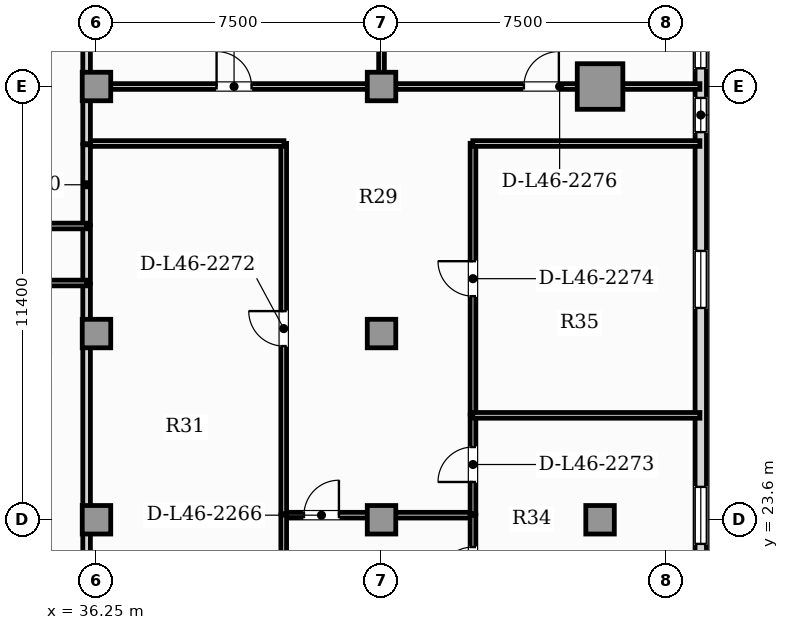
"""IFC4 building model, lengths in metres.
Left out: names, types, materials, properties, quantities, classifications, styles, units other than length and angle.
Written with IfcOpenShell. Run it as: python <this file> out.ifc"""

import sys

from ifc_helpers import new_model, si_unit, direction, frame, frame_2d, origin, origin_2d, place, context, subcontext, project, spatial, rectangle, hollow_rectangle, extrude, element, fill, save


model = new_model("IFC4")
c1 = context("Model", 3, precision=1e-05, world=origin(), true_north=direction((0.0, 1.0)))
c2 = subcontext(c1, "Body", "Model", "MODEL_VIEW")
j1 = project(units=[si_unit("LENGTHUNIT", "METRE"), si_unit("PLANEANGLEUNIT", "RADIAN")], contexts=[c1])
p1 = place(None, origin())
s1 = spatial("IfcSite", under=j1, at=p1, CompositionType="ELEMENT")
p2 = place(p1, origin())
s2 = spatial("IfcBuilding", under=s1, at=p2, CompositionType="ELEMENT")
p3 = place(p2, frame((0.0, 0.0, 187.55)))
s3 = spatial("IfcBuildingStorey", under=s2, at=p3, CompositionType="ELEMENT", Elevation=187.55)
p4 = place(p3, frame((49.5, 35.0, 0.0), z_axis=(0.0, 0.0, 1.0), x_axis=(1.0, 0.0, 0.0)))
e1 = element("IfcColumn", 1, at=p4, inside=s3, PredefinedType="USERDEFINED", context=c2, shape_type="SweptSolid", body=[
    extrude(hollow_rectangle(XDim=1.2, YDim=1.2, WallThickness=0.07, at=origin_2d()), origin(), (0.0, 0.0, 1.0), 5.05),
])
for number, where, z_axis, x_axis in (
    (2, (36.25, 23.6, 0.0), (0.0, 0.0, 1.0), (1.0, 0.0, 0.0)),
    (3, (43.75, 23.6, 0.0), (0.0, 0.0, 1.0), (1.0, 0.0, 0.0)),
    (4, (49.5, 23.6, 0.0), (0.0, 0.0, 1.0), (1.0, 0.0, 0.0)),
    (5, (36.25, 28.5, 0.0), (0.0, 0.0, 1.0), (1.0, 0.0, 0.0)),
    (6, (43.75, 28.5, 0.0), (0.0, 0.0, 1.0), (1.0, 0.0, 0.0)),
    (7, (36.25, 35.0, 0.0), (0.0, 0.0, 1.0), (1.0, 0.0, 0.0)),
    (8, (43.75, 35.0, 0.0), (0.0, 0.0, 1.0), (1.0, 0.0, 0.0)),
):
    element("IfcColumn", number, at=place(p3, frame(where, z_axis=z_axis, x_axis=x_axis)), inside=s3, PredefinedType="COLUMN", context=c2, shape_type="SweptSolid", body=[
        extrude(rectangle(XDim=0.75, YDim=0.75, at=origin_2d()), origin(), (0.0, 0.0, 1.0), 5.05),
    ])
p5 = place(p3, frame((52.15, 3.24, 0.0), z_axis=(0.0, 0.0, 1.0), x_axis=(0.0, 1.0, 0.0)))
e9 = element("IfcWall", 9, at=p5, inside=s3, PredefinedType="SOLIDWALL", context=c2, shape_type="SweptSolid", body=[
    extrude(rectangle(XDim=33.92, YDim=0.3, at=frame_2d((16.96, 0.0))), origin(), (0.0, 0.0, 1.0), 4.83),
])
p6 = place(p5, frame((30.56, 0.0, 0.95)))
e10 = element("IfcOpeningElement", 10, at=p6, cuts=e9, PredefinedType="OPENING", context=c2, shape_type="SweptSolid", body=[
    extrude(rectangle(XDim=0.9, YDim=1.5, at=frame_2d((0.45, 0.75))), frame((0.0, 0.16, 0.0), z_axis=(0.0, -1.0, 0.0), x_axis=(1.0, 0.0, 0.0)), (0.0, 0.0, 1.0), 0.32),
])
p7 = place(p5, frame((10.805, 0.0, 0.9)))
e11 = element("IfcOpeningElement", 11, at=p7, cuts=e9, PredefinedType="OPENING", context=c2, shape_type="SweptSolid", body=[
    extrude(rectangle(XDim=1.5, YDim=1.95, at=frame_2d((0.75, 0.975))), frame((0.0, 0.16, 0.0), z_axis=(0.0, -1.0, 0.0), x_axis=(1.0, 0.0, 0.0)), (0.0, 0.0, 1.0), 0.32),
])
p8 = place(p5, frame((14.462, 0.0, 0.9)))
e12 = element("IfcOpeningElement", 12, at=p8, cuts=e9, PredefinedType="OPENING", context=c2, shape_type="SweptSolid", body=[
    extrude(rectangle(XDim=1.5, YDim=1.95, at=frame_2d((0.75, 0.975))), frame((0.0, 0.16, 0.0), z_axis=(0.0, -1.0, 0.0), x_axis=(1.0, 0.0, 0.0)), (0.0, 0.0, 1.0), 0.32),
])
p9 = place(p5, frame((19.726, 0.0, 0.9)))
e13 = element("IfcOpeningElement", 13, at=p9, cuts=e9, PredefinedType="OPENING", context=c2, shape_type="SweptSolid", body=[
    extrude(rectangle(XDim=1.5, YDim=1.95, at=frame_2d((0.75, 0.975))), frame((0.0, 0.16, 0.0), z_axis=(0.0, -1.0, 0.0), x_axis=(1.0, 0.0, 0.0)), (0.0, 0.0, 1.0), 0.32),
])
p10 = place(p5, frame((25.934, 0.0, 0.9)))
e14 = element("IfcOpeningElement", 14, at=p10, cuts=e9, PredefinedType="OPENING", context=c2, shape_type="SweptSolid", body=[
    extrude(rectangle(XDim=1.5, YDim=1.95, at=frame_2d((0.75, 0.975))), frame((0.0, 0.16, 0.0), z_axis=(0.0, -1.0, 0.0), x_axis=(1.0, 0.0, 0.0)), (0.0, 0.0, 1.0), 0.32),
])
p11 = place(p5, frame((32.24, 0.0, 0.95)))
e15 = element("IfcOpeningElement", 15, at=p11, cuts=e9, PredefinedType="OPENING", context=c2, shape_type="SweptSolid", body=[
    extrude(rectangle(XDim=0.9, YDim=1.5, at=frame_2d((0.45, 0.75))), frame((0.0, 0.16, 0.0), z_axis=(0.0, -1.0, 0.0), x_axis=(1.0, 0.0, 0.0)), (0.0, 0.0, 1.0), 0.32),
])
p12 = place(p3, frame((41.171, 23.721, 0.0), z_axis=(0.0, 0.0, 1.0), x_axis=(1.0, 0.0, 0.0)))
e16 = element("IfcWall", 16, at=p12, inside=s3, PredefinedType="PARTITIONING", context=c2, shape_type="SweptSolid", body=[
    extrude(rectangle(XDim=4.99, YDim=0.15, at=frame_2d((2.495, 0.0))), origin(), (0.0, 0.0, 1.0), 4.285),
])
p13 = place(p12, frame((0.538, 0.0, 0.0)))
e17 = element("IfcOpeningElement", 17, at=p13, cuts=e16, PredefinedType="OPENING", context=c2, shape_type="SweptSolid", body=[
    extrude(rectangle(XDim=0.92, YDim=2.1, at=frame_2d((0.46, 1.05))), frame((0.0, 0.085, 0.0), z_axis=(0.0, -1.0, 0.0), x_axis=(1.0, 0.0, 0.0)), (0.0, 0.0, 1.0), 0.17),
])
p14 = place(p3, frame((41.177, 15.635, 0.0), z_axis=(0.0, 0.0, 1.0), x_axis=(0.0, 1.0, 0.0)))
e18 = element("IfcWall", 18, at=p14, inside=s3, PredefinedType="PARTITIONING", context=c2, shape_type="SweptSolid", body=[
    extrude(rectangle(XDim=8.091, YDim=0.15, at=frame_2d((4.045, 0.0))), origin(), (0.0, 0.0, 1.0), 4.83),
])
p15 = place(p14, frame((3.585, 0.0, 0.0)))
e19 = element("IfcOpeningElement", 19, at=p15, cuts=e18, PredefinedType="OPENING", context=c2, shape_type="SweptSolid", body=[
    extrude(rectangle(XDim=0.92, YDim=2.1, at=frame_2d((0.46, 1.05))), frame((0.0, 0.085, 0.0), z_axis=(0.0, -1.0, 0.0), x_axis=(1.0, 0.0, 0.0)), (0.0, 0.0, 1.0), 0.17),
])
p16 = place(p3, frame((46.156, 21.119, 0.0), z_axis=(0.0, 0.0, 1.0), x_axis=(0.0, 1.0, 0.0)))
e20 = element("IfcWall", 20, at=p16, inside=s3, PredefinedType="PARTITIONING", context=c2, shape_type="SweptSolid", body=[
    extrude(rectangle(XDim=2.607, YDim=0.15, at=frame_2d((1.304, 0.0))), origin(), (0.0, 0.0, 1.0), 4.83),
])
p17 = place(p16, frame((0.844, 0.0, 0.0)))
e21 = element("IfcOpeningElement", 21, at=p17, cuts=e20, PredefinedType="OPENING", context=c2, shape_type="SweptSolid", body=[
    extrude(rectangle(XDim=0.92, YDim=2.1, at=frame_2d((0.46, 1.05))), frame((0.0, 0.085, 0.0), z_axis=(0.0, -1.0, 0.0), x_axis=(1.0, 0.0, 0.0)), (0.0, 0.0, 1.0), 0.17),
])
p18 = place(p3, frame((41.177, 23.756, 0.0), z_axis=(0.0, 0.0, 1.0), x_axis=(0.0, 1.0, 0.0)))
e22 = element("IfcWall", 22, at=p18, inside=s3, PredefinedType="PARTITIONING", context=c2, shape_type="SweptSolid", body=[
    extrude(rectangle(XDim=9.749, YDim=0.15, at=frame_2d((4.875, 0.0))), origin(), (0.0, 0.0, 1.0), 4.83),
])
p19 = place(p18, frame((4.415, 0.0, 0.0)))
e23 = element("IfcOpeningElement", 23, at=p19, cuts=e22, PredefinedType="OPENING", context=c2, shape_type="SweptSolid", body=[
    extrude(rectangle(XDim=0.92, YDim=2.1, at=frame_2d((0.46, 1.05))), frame((0.0, 0.085, 0.0), z_axis=(0.0, -1.0, 0.0), x_axis=(1.0, 0.0, 0.0)), (0.0, 0.0, 1.0), 0.17),
])
p20 = place(p3, frame((35.985, 33.5, 0.0), z_axis=(0.0, 0.0, 1.0), x_axis=(1.0, 0.0, 0.0)))
e24 = element("IfcWall", 24, at=p20, inside=s3, PredefinedType="PARTITIONING", context=c2, shape_type="SweptSolid", body=[
    extrude(rectangle(XDim=5.196, YDim=0.15, at=frame_2d((2.598, 0.0))), origin(), (0.0, 0.0, 1.0), 4.83),
])
p21 = place(p3, frame((46.156, 23.756, 0.0), z_axis=(0.0, 0.0, 1.0), x_axis=(0.0, 1.0, 0.0)))
e25 = element("IfcWall", 25, at=p21, inside=s3, PredefinedType="PARTITIONING", context=c2, shape_type="SweptSolid", body=[
    extrude(rectangle(XDim=2.596, YDim=0.15, at=frame_2d((1.298, 0.0))), origin(), (0.0, 0.0, 1.0), 4.83),
])
p22 = place(p21, frame((0.838, 0.0, 0.0)))
e26 = element("IfcOpeningElement", 26, at=p22, cuts=e25, PredefinedType="OPENING", context=c2, shape_type="SweptSolid", body=[
    extrude(rectangle(XDim=0.92, YDim=2.1, at=frame_2d((0.46, 1.05))), frame((0.0, 0.085, 0.0), z_axis=(0.0, -1.0, 0.0), x_axis=(1.0, 0.0, 0.0)), (0.0, 0.0, 1.0), 0.17),
])
p23 = place(p3, frame((46.156, 26.382, 0.0), z_axis=(0.0, 0.0, 1.0), x_axis=(0.0, 1.0, 0.0)))
e27 = element("IfcWall", 27, at=p23, inside=s3, PredefinedType="PARTITIONING", context=c2, shape_type="SweptSolid", body=[
    extrude(rectangle(XDim=7.123, YDim=0.15, at=frame_2d((3.561, 0.0))), origin(), (0.0, 0.0, 1.0), 4.83),
])
p24 = place(p23, frame((3.101, 0.0, 0.0)))
e28 = element("IfcOpeningElement", 28, at=p24, cuts=e27, PredefinedType="OPENING", context=c2, shape_type="SweptSolid", body=[
    extrude(rectangle(XDim=0.92, YDim=2.1, at=frame_2d((0.46, 1.05))), frame((0.0, 0.085, 0.0), z_axis=(0.0, -1.0, 0.0), x_axis=(1.0, 0.0, 0.0)), (0.0, 0.0, 1.0), 0.17),
])
p25 = place(p3, frame((46.151, 33.5, 0.0), z_axis=(0.0, 0.0, 1.0), x_axis=(1.0, 0.0, 0.0)))
e29 = element("IfcWall", 29, at=p25, inside=s3, PredefinedType="PARTITIONING", context=c2, shape_type="SweptSolid", body=[
    extrude(rectangle(XDim=5.976, YDim=0.15, at=frame_2d((2.988, 0.0))), origin(), (0.0, 0.0, 1.0), 4.83),
])
p26 = place(p3, frame((35.985, 35.0, 0.0), z_axis=(0.0, 0.0, 1.0), x_axis=(1.0, 0.0, 0.0)))
e30 = element("IfcWall", 30, at=p26, inside=s3, PredefinedType="PARTITIONING", context=c2, shape_type="SweptSolid", body=[
    extrude(rectangle(XDim=7.77, YDim=0.15, at=frame_2d((3.885, 0.0))), origin(), (0.0, 0.0, 1.0), 4.285),
])
p27 = place(p26, frame((3.425, 0.0, 0.0)))
e31 = element("IfcOpeningElement", 31, at=p27, cuts=e30, PredefinedType="OPENING", context=c2, shape_type="SweptSolid", body=[
    extrude(rectangle(XDim=0.92, YDim=2.1, at=frame_2d((0.46, 1.05))), frame((0.0, 0.085, 0.0), z_axis=(0.0, -1.0, 0.0), x_axis=(1.0, 0.0, 0.0)), (0.0, 0.0, 1.0), 0.17),
])
p28 = place(p3, frame((43.785, 35.0, 0.0), z_axis=(0.0, 0.0, 1.0), x_axis=(1.0, 0.0, 0.0)))
e32 = element("IfcWall", 32, at=p28, inside=s3, PredefinedType="PARTITIONING", context=c2, shape_type="SweptSolid", body=[
    extrude(rectangle(XDim=8.343, YDim=0.15, at=frame_2d((4.171, 0.0))), origin(), (0.0, 0.0, 1.0), 4.285),
])
p29 = place(p28, frame((3.711, 0.0, 0.0)))
e33 = element("IfcOpeningElement", 33, at=p29, cuts=e32, PredefinedType="OPENING", context=c2, shape_type="SweptSolid", body=[
    extrude(rectangle(XDim=0.92, YDim=2.1, at=frame_2d((0.46, 1.05))), frame((0.0, 0.085, 0.0), z_axis=(0.0, -1.0, 0.0), x_axis=(1.0, 0.0, 0.0)), (0.0, 0.0, 1.0), 0.17),
])
p30 = place(p3, frame((35.99, 33.495, 0.0), z_axis=(0.0, 0.0, 1.0), x_axis=(0.0, 1.0, 0.0)))
e34 = element("IfcWall", 34, at=p30, inside=s3, PredefinedType="PARTITIONING", context=c2, shape_type="SweptSolid", body=[
    extrude(rectangle(XDim=2.988, YDim=0.2, at=frame_2d((1.494, 0.0))), origin(), (0.0, 0.0, 1.0), 4.83),
])
p31 = place(p3, frame((35.99, 29.825, 0.0), z_axis=(0.0, 0.0, 1.0), x_axis=(0.0, 1.0, 0.0)))
e35 = element("IfcWall", 35, at=p31, inside=s3, PredefinedType="PARTITIONING", context=c2, shape_type="SweptSolid", body=[
    extrude(rectangle(XDim=1.51, YDim=0.2, at=frame_2d((0.755, 0.0))), origin(), (0.0, 0.0, 1.0), 4.83),
])
p32 = place(p3, frame((35.99, 21.945, 0.0), z_axis=(0.0, 0.0, 1.0), x_axis=(0.0, 1.0, 0.0)))
e36 = element("IfcWall", 36, at=p32, inside=s3, PredefinedType="PARTITIONING", context=c2, shape_type="SweptSolid", body=[
    extrude(rectangle(XDim=7.85, YDim=0.2, at=frame_2d((3.925, 0.0))), origin(), (0.0, 0.0, 1.0), 4.83),
])
p33 = place(p3, frame((35.99, 31.365, 0.0), z_axis=(0.0, 0.0, 1.0), x_axis=(0.0, 1.0, 0.0)))
e37 = element("IfcWall", 37, at=p33, inside=s3, PredefinedType="PARTITIONING", context=c2, shape_type="SweptSolid", body=[
    extrude(rectangle(XDim=2.1, YDim=0.2, at=frame_2d((1.05, 0.0))), origin(), (0.0, 0.0, 1.0), 4.83),
])
p34 = place(p3, frame((46.151, 26.347, 0.0), z_axis=(0.0, 0.0, 1.0), x_axis=(1.0, 0.0, 0.0)))
e38 = element("IfcWall", 38, at=p34, inside=s3, PredefinedType="PARTITIONING", context=c2, shape_type="SweptSolid", body=[
    extrude(rectangle(XDim=5.976, YDim=0.15, at=frame_2d((2.988, 0.0))), origin(), (0.0, 0.0, 1.0), 4.83),
])
p35 = place(p3, frame((43.75, 34.995, 0.0), z_axis=(0.0, 0.0, 1.0), x_axis=(0.0, 1.0, 0.0)))
e39 = element("IfcWall", 39, at=p35, inside=s3, PredefinedType="PARTITIONING", context=c2, shape_type="SweptSolid", body=[
    extrude(rectangle(XDim=5.232, YDim=0.15, at=frame_2d((2.616, 0.0))), origin(), (0.0, 0.0, 1.0), 4.83),
])
p36 = place(p3, frame((31.265, 29.83, 0.0), z_axis=(0.0, 0.0, 1.0), x_axis=(1.0, 0.0, 0.0)))
e40 = element("IfcWall", 40, at=p36, inside=s3, PredefinedType="PARTITIONING", context=c2, shape_type="SweptSolid", body=[
    extrude(rectangle(XDim=4.73, YDim=0.15, at=frame_2d((2.365, 0.0))), origin(), (0.0, 0.0, 1.0), 4.83),
])
p37 = place(p3, frame((28.785, 31.33, 0.0), z_axis=(0.0, 0.0, 1.0), x_axis=(1.0, 0.0, 0.0)))
e41 = element("IfcWall", 41, at=p37, inside=s3, PredefinedType="PARTITIONING", context=c2, shape_type="SweptSolid", body=[
    extrude(rectangle(XDim=7.21, YDim=0.15, at=frame_2d((3.605, 0.0))), origin(), (0.0, 0.0, 1.0), 4.83),
])
p38 = place(p37, frame((3.145, 0.0, 0.0)))
e42 = element("IfcOpeningElement", 42, at=p38, cuts=e41, PredefinedType="OPENING", context=c2, shape_type="SweptSolid", body=[
    extrude(rectangle(XDim=0.92, YDim=2.1, at=frame_2d((0.46, 1.05))), frame((0.0, 0.085, 0.0), z_axis=(0.0, -1.0, 0.0), x_axis=(1.0, 0.0, 0.0)), (0.0, 0.0, 1.0), 0.17),
])
p39 = place(p6, origin())
e43 = element("IfcWindow", 43, at=p39, inside=s3, PartitioningType="SINGLE_PANEL", PredefinedType="WINDOW", context=c2, shape_type="SweptSolid", body=[
    extrude(rectangle(XDim=0.9, YDim=1.5, at=frame_2d((0.45, 0.75))), frame((0.0, 0.03, 0.0), z_axis=(0.0, -1.0, 0.0), x_axis=(1.0, 0.0, 0.0)), (0.0, 0.0, 1.0), 0.06),
])
fill(e10, e43)
p40 = place(p9, origin())
e44 = element("IfcWindow", 44, at=p40, inside=s3, PartitioningType="SINGLE_PANEL", PredefinedType="WINDOW", context=c2, shape_type="SweptSolid", body=[
    extrude(rectangle(XDim=1.5, YDim=1.95, at=frame_2d((0.75, 0.975))), frame((0.0, 0.03, 0.0), z_axis=(0.0, -1.0, 0.0), x_axis=(1.0, 0.0, 0.0)), (0.0, 0.0, 1.0), 0.06),
])
fill(e13, e44)
p41 = place(p10, origin())
e45 = element("IfcWindow", 45, at=p41, inside=s3, PartitioningType="SINGLE_PANEL", PredefinedType="WINDOW", context=c2, shape_type="SweptSolid", body=[
    extrude(rectangle(XDim=1.5, YDim=1.95, at=frame_2d((0.75, 0.975))), frame((0.0, 0.03, 0.0), z_axis=(0.0, -1.0, 0.0), x_axis=(1.0, 0.0, 0.0)), (0.0, 0.0, 1.0), 0.06),
])
fill(e14, e45)
p42 = place(p11, origin())
e46 = element("IfcWindow", 46, at=p42, inside=s3, PartitioningType="SINGLE_PANEL", PredefinedType="WINDOW", context=c2, shape_type="SweptSolid", body=[
    extrude(rectangle(XDim=0.9, YDim=1.5, at=frame_2d((0.45, 0.75))), frame((0.0, 0.03, 0.0), z_axis=(0.0, -1.0, 0.0), x_axis=(1.0, 0.0, 0.0)), (0.0, 0.0, 1.0), 0.06),
])
fill(e15, e46)
p43 = place(p13, origin())
e47 = element("IfcDoor", 47, at=p43, inside=s3, OperationType="SINGLE_SWING_RIGHT", PredefinedType="DOOR", context=c2, shape_type="SweptSolid", body=[
    extrude(rectangle(XDim=0.92, YDim=2.1, at=frame_2d((0.46, 1.05))), frame((0.0, 0.025, 0.0), z_axis=(0.0, -1.0, 0.0), x_axis=(1.0, 0.0, 0.0)), (0.0, 0.0, 1.0), 0.05),
])
fill(e17, e47)
p44 = place(p17, origin())
e48 = element("IfcDoor", 48, at=p44, inside=s3, OperationType="SINGLE_SWING_LEFT", PredefinedType="DOOR", context=c2, shape_type="SweptSolid", body=[
    extrude(rectangle(XDim=0.92, YDim=2.1, at=frame_2d((0.46, 1.05))), frame((0.0, 0.025, 0.0), z_axis=(0.0, -1.0, 0.0), x_axis=(1.0, 0.0, 0.0)), (0.0, 0.0, 1.0), 0.05),
])
fill(e21, e48)
p45 = place(p19, origin())
e49 = element("IfcDoor", 49, at=p45, inside=s3, OperationType="SINGLE_SWING_RIGHT", PredefinedType="DOOR", context=c2, shape_type="SweptSolid", body=[
    extrude(rectangle(XDim=0.92, YDim=2.1, at=frame_2d((0.46, 1.05))), frame((0.0, 0.025, 0.0), z_axis=(0.0, -1.0, 0.0), x_axis=(1.0, 0.0, 0.0)), (0.0, 0.0, 1.0), 0.05),
])
fill(e23, e49)
p46 = place(p22, origin())
e50 = element("IfcDoor", 50, at=p46, inside=s3, OperationType="SINGLE_SWING_LEFT", PredefinedType="DOOR", context=c2, shape_type="SweptSolid", body=[
    extrude(rectangle(XDim=0.92, YDim=2.1, at=frame_2d((0.46, 1.05))), frame((0.0, 0.025, 0.0), z_axis=(0.0, -1.0, 0.0), x_axis=(1.0, 0.0, 0.0)), (0.0, 0.0, 1.0), 0.05),
])
fill(e26, e50)
p47 = place(p24, origin())
e51 = element("IfcDoor", 51, at=p47, inside=s3, OperationType="SINGLE_SWING_RIGHT", PredefinedType="DOOR", context=c2, shape_type="SweptSolid", body=[
    extrude(rectangle(XDim=0.92, YDim=2.1, at=frame_2d((0.46, 1.05))), frame((0.0, 0.025, 0.0), z_axis=(0.0, -1.0, 0.0), x_axis=(1.0, 0.0, 0.0)), (0.0, 0.0, 1.0), 0.05),
])
fill(e28, e51)
p48 = place(p27, origin())
e52 = element("IfcDoor", 52, at=p48, inside=s3, OperationType="SINGLE_SWING_LEFT", PredefinedType="DOOR", context=c2, shape_type="SweptSolid", body=[
    extrude(rectangle(XDim=0.92, YDim=2.1, at=frame_2d((0.46, 1.05))), frame((0.0, 0.025, 0.0), z_axis=(0.0, -1.0, 0.0), x_axis=(1.0, 0.0, 0.0)), (0.0, 0.0, 1.0), 0.05),
])
fill(e31, e52)
p49 = place(p29, origin())
e53 = element("IfcDoor", 53, at=p49, inside=s3, OperationType="SINGLE_SWING_RIGHT", PredefinedType="DOOR", context=c2, shape_type="SweptSolid", body=[
    extrude(rectangle(XDim=0.92, YDim=2.1, at=frame_2d((0.46, 1.05))), frame((0.0, 0.025, 0.0), z_axis=(0.0, -1.0, 0.0), x_axis=(1.0, 0.0, 0.0)), (0.0, 0.0, 1.0), 0.05),
])
fill(e33, e53)
save(model, sys.argv[1])
